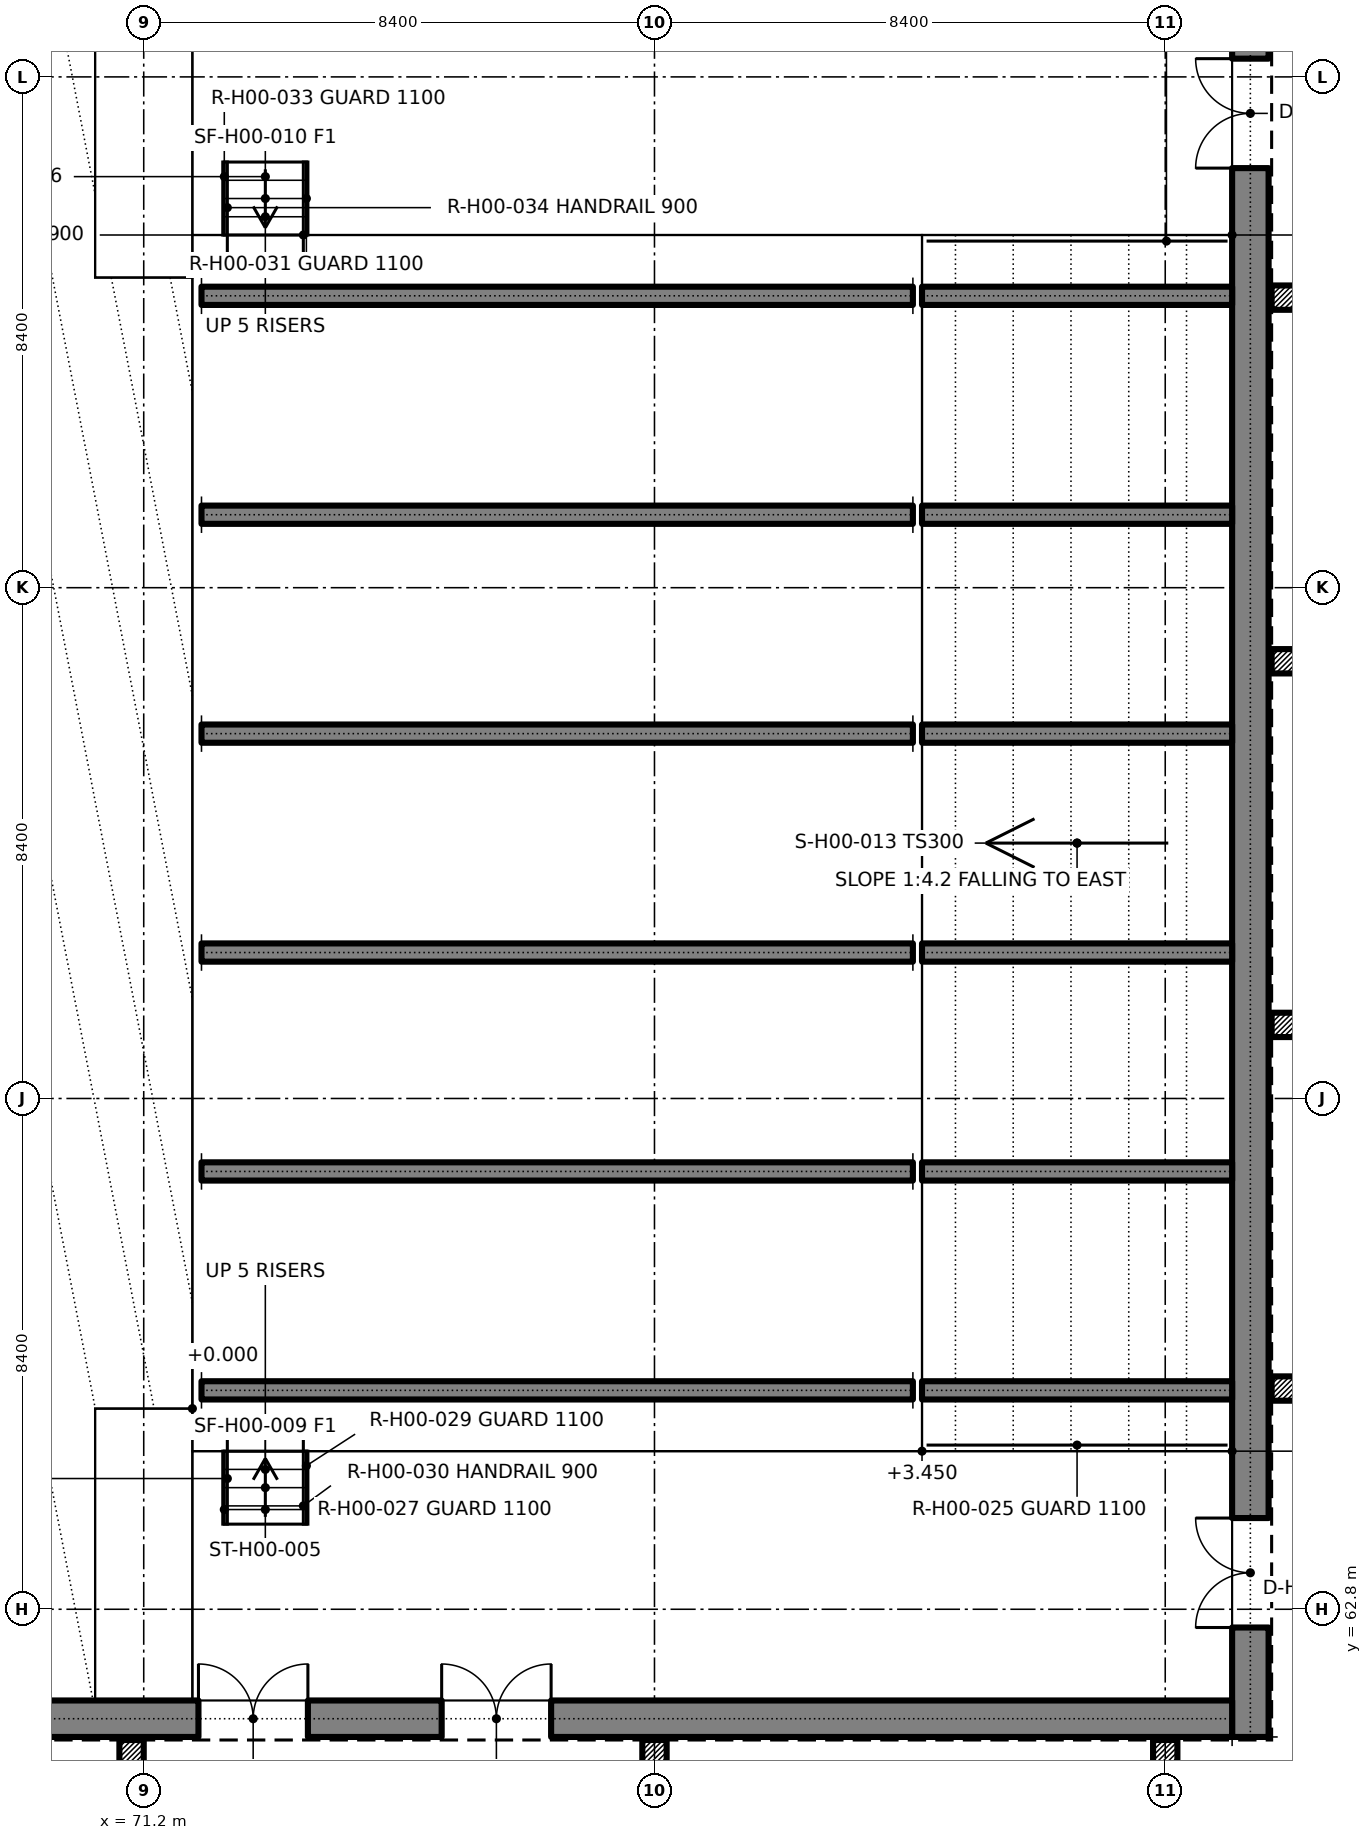
"""IFC4 building model, lengths in metres.
Left out: names, types, materials, properties, quantities, classifications, styles, units other than length and angle.
Written with IfcOpenShell. Run it as: python <this file> out.ifc"""

import sys

from ifc_helpers import new_model, si_unit, direction, frame, frame_2d, origin, origin_2d, place, context, subcontext, project, spatial, polyline, rectangle, outline, extrude, element, fill, save


model = new_model("IFC4")
c1 = context("Model", 3, precision=1e-05, world=origin(), true_north=direction((0.0, 1.0)))
c2 = subcontext(c1, "Body", "Model", "MODEL_VIEW")
j1 = project(units=[si_unit("LENGTHUNIT", "METRE"), si_unit("PLANEANGLEUNIT", "RADIAN")], contexts=[c1])
p1 = place(None, origin())
s1 = spatial("IfcSite", under=j1, at=p1, CompositionType="ELEMENT")
p2 = place(p1, origin())
s2 = spatial("IfcBuilding", under=s1, at=p2, CompositionType="ELEMENT")
p3 = place(p2, origin())
s3 = spatial("IfcBuildingStorey", under=s2, at=p3, CompositionType="ELEMENT", Elevation=0.0)
p4 = place(p3, frame((89.4, 60.7, 0.0), z_axis=(0.0, 0.0, 1.0), x_axis=(0.0, 1.0, 0.0)))
e1 = element("IfcWall", 1, at=p4, inside=s3, PredefinedType="SOLIDWALL", context=c2, shape_type="SweptSolid", body=[
    extrude(rectangle(XDim=29.4, YDim=0.6, at=frame_2d((14.7, 0.0))), origin(), (0.0, 0.0, 1.0), 5.4),
])
p5 = place(p4, frame((1.8, 0.0, 0.0)))
e2 = element("IfcOpeningElement", 2, at=p5, cuts=e1, PredefinedType="OPENING", context=c2, shape_type="SweptSolid", body=[
    extrude(rectangle(XDim=1.8, YDim=2.1, at=frame_2d((0.9, 1.05))), frame((0.0, 0.31, 0.0), z_axis=(0.0, -1.0, 0.0), x_axis=(1.0, 0.0, 0.0)), (0.0, 0.0, 1.0), 0.62),
])
p6 = place(p4, frame((25.8, 0.0, 0.0)))
e3 = element("IfcOpeningElement", 3, at=p6, cuts=e1, PredefinedType="OPENING", context=c2, shape_type="SweptSolid", body=[
    extrude(rectangle(XDim=1.8, YDim=2.1, at=frame_2d((0.9, 1.05))), frame((0.0, 0.31, 0.0), z_axis=(0.0, -1.0, 0.0), x_axis=(1.0, 0.0, 0.0)), (0.0, 0.0, 1.0), 0.62),
])
p7 = place(p3, frame((36.5, 61.0, 0.0), z_axis=(0.0, 0.0, 1.0), x_axis=(1.0, 0.0, 0.0)))
e4 = element("IfcWall", 4, at=p7, inside=s3, PredefinedType="SOLIDWALL", context=c2, shape_type="SweptSolid", body=[
    extrude(rectangle(XDim=52.6, YDim=0.6, at=frame_2d((26.3, 0.0))), origin(), (0.0, 0.0, 1.0), 5.4),
])
p8 = place(p7, frame((35.6, 0.0, 0.0)))
e5 = element("IfcOpeningElement", 5, at=p8, cuts=e4, PredefinedType="OPENING", context=c2, shape_type="SweptSolid", body=[
    extrude(rectangle(XDim=1.8, YDim=2.1, at=frame_2d((0.9, 1.05))), frame((0.0, 0.31, 0.0), z_axis=(0.0, -1.0, 0.0), x_axis=(1.0, 0.0, 0.0)), (0.0, 0.0, 1.0), 0.62),
])
p9 = place(p7, frame((39.6, 0.0, 0.0)))
e6 = element("IfcOpeningElement", 6, at=p9, cuts=e4, PredefinedType="OPENING", context=c2, shape_type="SweptSolid", body=[
    extrude(rectangle(XDim=1.8, YDim=2.1, at=frame_2d((0.9, 1.05))), frame((0.0, 0.31, 0.0), z_axis=(0.0, -1.0, 0.0), x_axis=(1.0, 0.0, 0.0)), (0.0, 0.0, 1.0), 0.62),
])
for number, where, z_axis, x_axis in (
    (7, (71.0, 60.45, 0.0), (0.0, 0.0, 1.0), (1.0, 0.0, 0.0)),
    (8, (79.6, 60.45, 0.0), (0.0, 0.0, 1.0), (1.0, 0.0, 0.0)),
    (9, (88.0, 60.45, 0.0), (0.0, 0.0, 1.0), (1.0, 0.0, 0.0)),
    (10, (89.95, 66.43, 0.0), (0.0, 0.0, 1.0), (1.0, 0.0, 0.0)),
    (11, (89.95, 72.41, 0.0), (0.0, 0.0, 1.0), (1.0, 0.0, 0.0)),
    (12, (89.95, 78.39, 0.0), (0.0, 0.0, 1.0), (1.0, 0.0, 0.0)),
    (13, (89.95, 84.37, 0.0), (0.0, 0.0, 1.0), (1.0, 0.0, 0.0)),
):
    element("IfcColumn", number, at=place(p3, frame(where, z_axis=z_axis, x_axis=x_axis)), inside=s3, PredefinedType="COLUMN", context=c2, shape_type="SweptSolid", body=[
        extrude(rectangle(XDim=0.4, YDim=0.4, at=origin_2d()), origin(), (0.0, 0.0, 1.0), 5.4),
    ])
for number, where, z_axis, x_axis in (
    (14, (72.15, 66.4, 0.0), (0.0, 0.0, 1.0), (1.0, 0.0, 0.0)),
    (15, (72.15, 70.0, 0.0), (0.0, 0.0, 1.0), (1.0, 0.0, 0.0)),
    (16, (72.15, 73.6, 0.0), (0.0, 0.0, 1.0), (1.0, 0.0, 0.0)),
    (17, (72.15, 77.2, 0.0), (0.0, 0.0, 1.0), (1.0, 0.0, 0.0)),
    (18, (72.15, 80.8, 0.0), (0.0, 0.0, 1.0), (1.0, 0.0, 0.0)),
    (19, (72.15, 84.4, 0.0), (0.0, 0.0, 1.0), (1.0, 0.0, 0.0)),
):
    element("IfcWall", number, at=place(p3, frame(where, z_axis=z_axis, x_axis=x_axis)), inside=s3, PredefinedType="SOLIDWALL", context=c2, shape_type="SweptSolid", body=[
        extrude(rectangle(XDim=11.7, YDim=0.3, at=frame_2d((5.85, 0.0))), origin(), (0.0, 0.0, 1.0), 0.45),
    ])
for number, where, z_axis, x_axis in (
    (20, (84.0, 66.4, 0.0), (0.0, 0.0, 1.0), (1.0, 0.0, 0.0)),
    (21, (84.0, 70.0, 0.0), (0.0, 0.0, 1.0), (1.0, 0.0, 0.0)),
    (22, (84.0, 73.6, 0.0), (0.0, 0.0, 1.0), (1.0, 0.0, 0.0)),
    (23, (84.0, 77.2, 0.0), (0.0, 0.0, 1.0), (1.0, 0.0, 0.0)),
    (24, (84.0, 80.8, 0.0), (0.0, 0.0, 1.0), (1.0, 0.0, 0.0)),
    (25, (84.0, 84.4, 0.0), (0.0, 0.0, 1.0), (1.0, 0.0, 0.0)),
):
    element("IfcWall", number, at=place(p3, frame(where, z_axis=z_axis, x_axis=x_axis)), inside=s3, PredefinedType="SOLIDWALL", context=c2, shape_type="SweptSolid", body=[
        extrude(outline(polyline([(0.0, 0.0), (5.1, 0.0), (5.1, 1.95), (0.0, 0.75), (0.0, 0.0)])), frame((0.0, 0.15, 0.0), z_axis=(0.0, -1.0, 0.0), x_axis=(1.0, 0.0, 0.0)), (0.0, 0.0, 1.0), 0.3),
    ])
p10 = place(p3, frame((89.4, 60.7, -0.3), z_axis=(0.0, 0.0, 1.0), x_axis=(0.0, 1.0, 0.0)))
e26 = element("IfcWall", 26, at=p10, inside=s3, PredefinedType="SOLIDWALL", context=c2, shape_type="SweptSolid", body=[
    extrude(rectangle(XDim=1.27, YDim=0.6, at=frame_2d((0.635, 0.0))), origin(), (0.0, 0.0, 1.0), 0.3),
])
p11 = place(p3, frame((89.4, 65.01, -0.3), z_axis=(0.0, 0.0, 1.0), x_axis=(0.0, 1.0, 0.0)))
e27 = element("IfcWall", 27, at=p11, inside=s3, PredefinedType="SOLIDWALL", context=c2, shape_type="SweptSolid", body=[
    extrude(rectangle(XDim=2.84, YDim=0.6, at=frame_2d((1.42, 0.0))), origin(), (0.0, 0.0, 1.0), 0.3),
])
p12 = place(p3, frame((89.4, 70.89, -0.3), z_axis=(0.0, 0.0, 1.0), x_axis=(0.0, 1.0, 0.0)))
e28 = element("IfcWall", 28, at=p12, inside=s3, PredefinedType="SOLIDWALL", context=c2, shape_type="SweptSolid", body=[
    extrude(rectangle(XDim=3.04, YDim=0.6, at=frame_2d((1.52, 0.0))), origin(), (0.0, 0.0, 1.0), 0.3),
])
p13 = place(p3, frame((89.4, 76.87, -0.3), z_axis=(0.0, 0.0, 1.0), x_axis=(0.0, 1.0, 0.0)))
e29 = element("IfcWall", 29, at=p13, inside=s3, PredefinedType="SOLIDWALL", context=c2, shape_type="SweptSolid", body=[
    extrude(rectangle(XDim=3.04, YDim=0.6, at=frame_2d((1.52, 0.0))), origin(), (0.0, 0.0, 1.0), 0.3),
])
p14 = place(p3, frame((89.4, 82.95, -0.3), z_axis=(0.0, 0.0, 1.0), x_axis=(0.0, 1.0, 0.0)))
e30 = element("IfcWall", 30, at=p14, inside=s3, PredefinedType="SOLIDWALL", context=c2, shape_type="SweptSolid", body=[
    extrude(rectangle(XDim=2.84, YDim=0.6, at=frame_2d((1.42, 0.0))), origin(), (0.0, 0.0, 1.0), 0.3),
])
p15 = place(p3, frame((89.4, 73.93, -0.3), z_axis=(0.0, 0.0, 1.0), x_axis=(0.0, 1.0, 0.0)))
e31 = element("IfcWall", 31, at=p15, inside=s3, PredefinedType="SOLIDWALL", context=c2, shape_type="SweptSolid", body=[
    extrude(rectangle(XDim=2.94, YDim=0.6, at=frame_2d((1.47, 0.0))), origin(), (0.0, 0.0, 1.0), 0.3),
])
for number, where, z_axis, x_axis in (
    (32, (89.4, 61.97, -0.3), (0.0, 0.0, 1.0), (0.0, 1.0, 0.0)),
    (33, (89.4, 85.79, -0.3), (0.0, 0.0, 1.0), (0.0, 1.0, 0.0)),
):
    element("IfcWall", number, at=place(p3, frame(where, z_axis=z_axis, x_axis=x_axis)), inside=s3, PredefinedType="SOLIDWALL", context=c2, shape_type="SweptSolid", body=[
        extrude(rectangle(XDim=3.04, YDim=0.6, at=frame_2d((1.52, 0.0))), origin(), (0.0, 0.0, 1.0), 0.3),
    ])
p16 = place(p3, frame((89.4, 67.85, -0.3), z_axis=(0.0, 0.0, 1.0), x_axis=(0.0, 1.0, 0.0)))
e34 = element("IfcWall", 34, at=p16, inside=s3, PredefinedType="SOLIDWALL", context=c2, shape_type="SweptSolid", body=[
    extrude(rectangle(XDim=3.04, YDim=0.6, at=frame_2d((1.52, 0.0))), origin(), (0.0, 0.0, 1.0), 0.3),
])
for number, where, z_axis, x_axis in (
    (35, (89.4, 79.91, -0.3), (0.0, 0.0, 1.0), (0.0, 1.0, 0.0)),
    (36, (69.48, 61.0, -0.3), (0.0, 0.0, 1.0), (1.0, 0.0, 0.0)),
    (37, (78.08, 61.0, -0.3), (0.0, 0.0, 1.0), (1.0, 0.0, 0.0)),
):
    element("IfcWall", number, at=place(p3, frame(where, z_axis=z_axis, x_axis=x_axis)), inside=s3, PredefinedType="SOLIDWALL", context=c2, shape_type="SweptSolid", body=[
        extrude(rectangle(XDim=3.04, YDim=0.6, at=frame_2d((1.52, 0.0))), origin(), (0.0, 0.0, 1.0), 0.3),
    ])
p17 = place(p3, frame((86.48, 61.0, -0.3), z_axis=(0.0, 0.0, 1.0), x_axis=(1.0, 0.0, 0.0)))
e38 = element("IfcWall", 38, at=p17, inside=s3, PredefinedType="SOLIDWALL", context=c2, shape_type="SweptSolid", body=[
    extrude(rectangle(XDim=2.62, YDim=0.6, at=frame_2d((1.31, 0.0))), origin(), (0.0, 0.0, 1.0), 0.3),
])
p18 = place(p3, frame((72.52, 61.0, -0.3), z_axis=(0.0, 0.0, 1.0), x_axis=(1.0, 0.0, 0.0)))
e39 = element("IfcWall", 39, at=p18, inside=s3, PredefinedType="SOLIDWALL", context=c2, shape_type="SweptSolid", body=[
    extrude(rectangle(XDim=5.56, YDim=0.6, at=frame_2d((2.78, 0.0))), origin(), (0.0, 0.0, 1.0), 0.3),
])
p19 = place(p3, frame((81.12, 61.0, -0.3), z_axis=(0.0, 0.0, 1.0), x_axis=(1.0, 0.0, 0.0)))
e40 = element("IfcWall", 40, at=p19, inside=s3, PredefinedType="SOLIDWALL", context=c2, shape_type="SweptSolid", body=[
    extrude(rectangle(XDim=5.36, YDim=0.6, at=frame_2d((2.68, 0.0))), origin(), (0.0, 0.0, 1.0), 0.3),
])
p20 = place(p3, frame((72.15, 66.4, -0.805), z_axis=(0.0, 0.0, 1.0), x_axis=(1.0, 0.0, 0.0)))
e41 = element("IfcWall", 41, at=p20, inside=s3, PredefinedType="SOLIDWALL", context=c2, shape_type="SweptSolid", body=[
    extrude(rectangle(XDim=0.47, YDim=0.3, at=frame_2d((0.235, 0.0))), origin(), (0.0, 0.0, 1.0), 0.805),
])
p21 = place(p3, frame((72.62, 66.4, -0.3), z_axis=(0.0, 0.0, 1.0), x_axis=(1.0, 0.0, 0.0)))
e42 = element("IfcWall", 42, at=p21, inside=s3, PredefinedType="SOLIDWALL", context=c2, shape_type="SweptSolid", body=[
    extrude(rectangle(XDim=11.4, YDim=0.3, at=frame_2d((5.7, 0.0))), origin(), (0.0, 0.0, 1.0), 0.3),
])
p22 = place(p3, frame((72.15, 70.0, -0.805), z_axis=(0.0, 0.0, 1.0), x_axis=(1.0, 0.0, 0.0)))
e43 = element("IfcWall", 43, at=p22, inside=s3, PredefinedType="SOLIDWALL", context=c2, shape_type="SweptSolid", body=[
    extrude(rectangle(XDim=0.47, YDim=0.3, at=frame_2d((0.235, 0.0))), origin(), (0.0, 0.0, 1.0), 0.805),
])
p23 = place(p3, frame((72.62, 70.0, -0.3), z_axis=(0.0, 0.0, 1.0), x_axis=(1.0, 0.0, 0.0)))
e44 = element("IfcWall", 44, at=p23, inside=s3, PredefinedType="SOLIDWALL", context=c2, shape_type="SweptSolid", body=[
    extrude(rectangle(XDim=11.4, YDim=0.3, at=frame_2d((5.7, 0.0))), origin(), (0.0, 0.0, 1.0), 0.3),
])
p24 = place(p3, frame((72.0, 73.6, -0.805), z_axis=(0.0, 0.0, 1.0), x_axis=(1.0, 0.0, 0.0)))
e45 = element("IfcWall", 45, at=p24, inside=s3, PredefinedType="SOLIDWALL", context=c2, shape_type="SweptSolid", body=[
    extrude(rectangle(XDim=0.62, YDim=0.3, at=frame_2d((0.31, 0.0))), origin(), (0.0, 0.0, 1.0), 0.805),
])
p25 = place(p3, frame((72.62, 73.6, -0.3), z_axis=(0.0, 0.0, 1.0), x_axis=(1.0, 0.0, 0.0)))
e46 = element("IfcWall", 46, at=p25, inside=s3, PredefinedType="SOLIDWALL", context=c2, shape_type="SweptSolid", body=[
    extrude(rectangle(XDim=11.4, YDim=0.3, at=frame_2d((5.7, 0.0))), origin(), (0.0, 0.0, 1.0), 0.3),
])
p26 = place(p3, frame((72.0, 77.2, -0.805), z_axis=(0.0, 0.0, 1.0), x_axis=(1.0, 0.0, 0.0)))
e47 = element("IfcWall", 47, at=p26, inside=s3, PredefinedType="SOLIDWALL", context=c2, shape_type="SweptSolid", body=[
    extrude(rectangle(XDim=0.62, YDim=0.3, at=frame_2d((0.31, 0.0))), origin(), (0.0, 0.0, 1.0), 0.805),
])
p27 = place(p3, frame((72.62, 77.2, -0.3), z_axis=(0.0, 0.0, 1.0), x_axis=(1.0, 0.0, 0.0)))
e48 = element("IfcWall", 48, at=p27, inside=s3, PredefinedType="SOLIDWALL", context=c2, shape_type="SweptSolid", body=[
    extrude(rectangle(XDim=11.4, YDim=0.3, at=frame_2d((5.7, 0.0))), origin(), (0.0, 0.0, 1.0), 0.3),
])
p28 = place(p3, frame((72.15, 80.8, -0.805), z_axis=(0.0, 0.0, 1.0), x_axis=(1.0, 0.0, 0.0)))
e49 = element("IfcWall", 49, at=p28, inside=s3, PredefinedType="SOLIDWALL", context=c2, shape_type="SweptSolid", body=[
    extrude(rectangle(XDim=0.47, YDim=0.3, at=frame_2d((0.235, 0.0))), origin(), (0.0, 0.0, 1.0), 0.805),
])
p29 = place(p3, frame((72.62, 80.8, -0.3), z_axis=(0.0, 0.0, 1.0), x_axis=(1.0, 0.0, 0.0)))
e50 = element("IfcWall", 50, at=p29, inside=s3, PredefinedType="SOLIDWALL", context=c2, shape_type="SweptSolid", body=[
    extrude(rectangle(XDim=11.4, YDim=0.3, at=frame_2d((5.7, 0.0))), origin(), (0.0, 0.0, 1.0), 0.3),
])
p30 = place(p3, frame((72.15, 84.4, -0.805), z_axis=(0.0, 0.0, 1.0), x_axis=(1.0, 0.0, 0.0)))
e51 = element("IfcWall", 51, at=p30, inside=s3, PredefinedType="SOLIDWALL", context=c2, shape_type="SweptSolid", body=[
    extrude(rectangle(XDim=0.47, YDim=0.3, at=frame_2d((0.235, 0.0))), origin(), (0.0, 0.0, 1.0), 0.805),
])
p31 = place(p3, frame((72.62, 84.4, -0.3), z_axis=(0.0, 0.0, 1.0), x_axis=(1.0, 0.0, 0.0)))
e52 = element("IfcWall", 52, at=p31, inside=s3, PredefinedType="SOLIDWALL", context=c2, shape_type="SweptSolid", body=[
    extrude(rectangle(XDim=11.4, YDim=0.3, at=frame_2d((5.7, 0.0))), origin(), (0.0, 0.0, 1.0), 0.3),
])
p32 = place(p3, frame((88.43, 66.4, -0.3), z_axis=(0.0, 0.0, 1.0), x_axis=(1.0, 0.0, 0.0)))
e53 = element("IfcWall", 53, at=p32, inside=s3, PredefinedType="SOLIDWALL", context=c2, shape_type="SweptSolid", body=[
    extrude(rectangle(XDim=0.67, YDim=0.3, at=frame_2d((0.335, 0.0))), origin(), (0.0, 0.0, 1.0), 0.3),
])
p33 = place(p3, frame((84.02, 66.4, -0.3), z_axis=(0.0, 0.0, 1.0), x_axis=(1.0, 0.0, 0.0)))
e54 = element("IfcWall", 54, at=p33, inside=s3, PredefinedType="SOLIDWALL", context=c2, shape_type="SweptSolid", body=[
    extrude(rectangle(XDim=4.41, YDim=0.3, at=frame_2d((2.205, 0.0))), origin(), (0.0, 0.0, 1.0), 0.3),
])
p34 = place(p3, frame((84.02, 70.0, -0.3), z_axis=(0.0, 0.0, 1.0), x_axis=(1.0, 0.0, 0.0)))
e55 = element("IfcWall", 55, at=p34, inside=s3, PredefinedType="SOLIDWALL", context=c2, shape_type="SweptSolid", body=[
    extrude(rectangle(XDim=5.08, YDim=0.3, at=frame_2d((2.54, 0.0))), origin(), (0.0, 0.0, 1.0), 0.3),
])
p35 = place(p3, frame((88.43, 73.6, -0.3), z_axis=(0.0, 0.0, 1.0), x_axis=(1.0, 0.0, 0.0)))
e56 = element("IfcWall", 56, at=p35, inside=s3, PredefinedType="SOLIDWALL", context=c2, shape_type="SweptSolid", body=[
    extrude(rectangle(XDim=0.67, YDim=0.3, at=frame_2d((0.335, 0.0))), origin(), (0.0, 0.0, 1.0), 0.3),
])
p36 = place(p3, frame((84.02, 73.6, -0.3), z_axis=(0.0, 0.0, 1.0), x_axis=(1.0, 0.0, 0.0)))
e57 = element("IfcWall", 57, at=p36, inside=s3, PredefinedType="SOLIDWALL", context=c2, shape_type="SweptSolid", body=[
    extrude(rectangle(XDim=4.41, YDim=0.3, at=frame_2d((2.205, 0.0))), origin(), (0.0, 0.0, 1.0), 0.3),
])
p37 = place(p3, frame((88.43, 77.2, -0.3), z_axis=(0.0, 0.0, 1.0), x_axis=(1.0, 0.0, 0.0)))
e58 = element("IfcWall", 58, at=p37, inside=s3, PredefinedType="SOLIDWALL", context=c2, shape_type="SweptSolid", body=[
    extrude(rectangle(XDim=0.67, YDim=0.3, at=frame_2d((0.335, 0.0))), origin(), (0.0, 0.0, 1.0), 0.3),
])
p38 = place(p3, frame((84.02, 77.2, -0.3), z_axis=(0.0, 0.0, 1.0), x_axis=(1.0, 0.0, 0.0)))
e59 = element("IfcWall", 59, at=p38, inside=s3, PredefinedType="SOLIDWALL", context=c2, shape_type="SweptSolid", body=[
    extrude(rectangle(XDim=4.41, YDim=0.3, at=frame_2d((2.205, 0.0))), origin(), (0.0, 0.0, 1.0), 0.3),
])
p39 = place(p3, frame((84.02, 80.8, -0.3), z_axis=(0.0, 0.0, 1.0), x_axis=(1.0, 0.0, 0.0)))
e60 = element("IfcWall", 60, at=p39, inside=s3, PredefinedType="SOLIDWALL", context=c2, shape_type="SweptSolid", body=[
    extrude(rectangle(XDim=5.08, YDim=0.3, at=frame_2d((2.54, 0.0))), origin(), (0.0, 0.0, 1.0), 0.3),
])
p40 = place(p3, frame((88.43, 84.4, -0.3), z_axis=(0.0, 0.0, 1.0), x_axis=(1.0, 0.0, 0.0)))
e61 = element("IfcWall", 61, at=p40, inside=s3, PredefinedType="SOLIDWALL", context=c2, shape_type="SweptSolid", body=[
    extrude(rectangle(XDim=0.67, YDim=0.3, at=frame_2d((0.335, 0.0))), origin(), (0.0, 0.0, 1.0), 0.3),
])
p41 = place(p3, frame((84.02, 84.4, -0.3), z_axis=(0.0, 0.0, 1.0), x_axis=(1.0, 0.0, 0.0)))
e62 = element("IfcWall", 62, at=p41, inside=s3, PredefinedType="SOLIDWALL", context=c2, shape_type="SweptSolid", body=[
    extrude(rectangle(XDim=4.41, YDim=0.3, at=frame_2d((2.205, 0.0))), origin(), (0.0, 0.0, 1.0), 0.3),
])
p42 = place(p8, origin())
e63 = element("IfcDoor", 63, at=p42, inside=s3, OperationType="DOUBLE_DOOR_SINGLE_SWING", PredefinedType="DOOR", context=c2, shape_type="SweptSolid", body=[
    extrude(rectangle(XDim=1.8, YDim=2.1, at=frame_2d((0.9, 1.05))), frame((0.0, 0.025, 0.0), z_axis=(0.0, -1.0, 0.0), x_axis=(1.0, 0.0, 0.0)), (0.0, 0.0, 1.0), 0.05),
])
fill(e5, e63)
p43 = place(p9, origin())
e64 = element("IfcDoor", 64, at=p43, inside=s3, OperationType="DOUBLE_DOOR_SINGLE_SWING", PredefinedType="DOOR", context=c2, shape_type="SweptSolid", body=[
    extrude(rectangle(XDim=1.8, YDim=2.1, at=frame_2d((0.9, 1.05))), frame((0.0, 0.025, 0.0), z_axis=(0.0, -1.0, 0.0), x_axis=(1.0, 0.0, 0.0)), (0.0, 0.0, 1.0), 0.05),
])
fill(e6, e64)
p44 = place(p5, origin())
e65 = element("IfcDoor", 65, at=p44, inside=s3, OperationType="DOUBLE_DOOR_SINGLE_SWING", PredefinedType="DOOR", context=c2, shape_type="SweptSolid", body=[
    extrude(rectangle(XDim=1.8, YDim=2.1, at=frame_2d((0.9, 1.05))), frame((0.0, 0.025, 0.0), z_axis=(0.0, -1.0, 0.0), x_axis=(1.0, 0.0, 0.0)), (0.0, 0.0, 1.0), 0.05),
])
fill(e2, e65)
p45 = place(p6, origin())
e66 = element("IfcDoor", 66, at=p45, inside=s3, OperationType="DOUBLE_DOOR_SINGLE_SWING", PredefinedType="DOOR", context=c2, shape_type="SweptSolid", body=[
    extrude(rectangle(XDim=1.8, YDim=2.1, at=frame_2d((0.9, 1.05))), frame((0.0, 0.025, 0.0), z_axis=(0.0, -1.0, 0.0), x_axis=(1.0, 0.0, 0.0)), (0.0, 0.0, 1.0), 0.05),
])
fill(e3, e66)
save(model, sys.argv[1])
